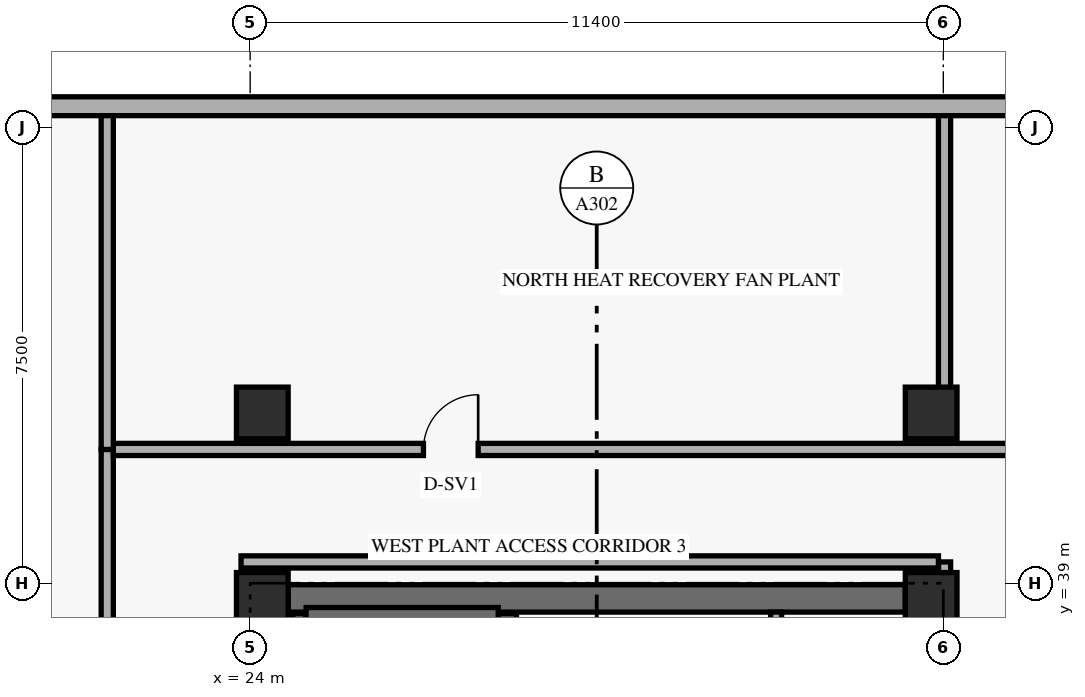
"""IFC4 building model, lengths in metres.
Left out: names, types, materials, properties, quantities, classifications, styles, units other than length and angle.
Written with IfcOpenShell. Run it as: python <this file> out.ifc"""

import sys

from ifc_helpers import new_model, si_unit, direction, frame, frame_2d, origin, origin_2d, place, context, subcontext, project, spatial, rectangle, extrude, element, fill, save


model = new_model("IFC4")
c1 = context("Model", 3, precision=1e-05, world=origin(), true_north=direction((0.0, 1.0)))
c2 = subcontext(c1, "Body", "Model", "MODEL_VIEW")
j1 = project(units=[si_unit("LENGTHUNIT", "METRE"), si_unit("PLANEANGLEUNIT", "RADIAN")], contexts=[c1])
p1 = place(None, origin())
s1 = spatial("IfcSite", under=j1, at=p1, CompositionType="ELEMENT")
p2 = place(p1, origin())
s2 = spatial("IfcBuilding", under=s1, at=p2, CompositionType="ELEMENT")
p3 = place(p2, frame((0.0, 0.0, 71.4)))
s3 = spatial("IfcBuildingStorey", under=s2, at=p3, CompositionType="ELEMENT", Elevation=71.4)
p4 = place(p3, frame((24.625, 38.75, 0.0), z_axis=(0.0, 0.0, 1.0), x_axis=(1.0, 0.0, 0.0)))
e1 = element("IfcWall", 1, at=p4, inside=s3, PredefinedType="SHEAR", context=c2, shape_type="SweptSolid", body=[
    extrude(rectangle(XDim=10.15, YDim=0.45, at=frame_2d((5.075, 0.0))), origin(), (0.0, 0.0, 1.0), 4.99),
])
p5 = place(p3, frame((24.81, 30.74, 0.0), z_axis=(0.0, 0.0, 1.0), x_axis=(0.0, 1.0, 0.0)))
e2 = element("IfcWall", 2, at=p5, inside=s3, PredefinedType="SHEAR", context=c2, shape_type="SweptSolid", body=[
    extrude(rectangle(XDim=7.76, YDim=0.22, at=frame_2d((3.88, 0.0))), origin(), (0.0, 0.0, 1.0), 4.99),
])
p6 = place(p3, frame((28.23, 30.74, 0.0), z_axis=(0.0, 0.0, 1.0), x_axis=(0.0, 1.0, 0.0)))
e3 = element("IfcWall", 3, at=p6, inside=s3, PredefinedType="SHEAR", context=c2, shape_type="SweptSolid", body=[
    extrude(rectangle(XDim=7.76, YDim=0.3, at=frame_2d((3.88, 0.0))), origin(), (0.0, 0.0, 1.0), 4.99),
])
p7 = place(p3, frame((24.92, 38.49, 0.0), z_axis=(0.0, 0.0, 1.0), x_axis=(1.0, 0.0, 0.0)))
e4 = element("IfcWall", 4, at=p7, inside=s3, PredefinedType="SHEAR", context=c2, shape_type="SweptSolid", body=[
    extrude(rectangle(XDim=3.16, YDim=0.22, at=frame_2d((1.58, 0.0))), origin(), (0.0, 0.0, 1.0), 4.99),
])
for number, where, z_axis, x_axis in (
    (5, (24.2, 38.75, 0.0), (0.0, 0.0, 1.0), (1.0, 0.0, 0.0)),
    (6, (24.2, 41.8, 0.0), (0.0, 0.0, 1.0), (1.0, 0.0, 0.0)),
    (7, (35.2, 38.75, 0.0), (0.0, 0.0, 1.0), (1.0, 0.0, 0.0)),
    (8, (35.2, 41.8, 0.0), (0.0, 0.0, 1.0), (1.0, 0.0, 0.0)),
):
    element("IfcColumn", number, at=place(p3, frame(where, z_axis=z_axis, x_axis=x_axis)), inside=s3, PredefinedType="COLUMN", context=c2, shape_type="SweptSolid", body=[
        extrude(rectangle(XDim=0.85, YDim=0.85, at=origin_2d()), origin(), (0.0, 0.0, 1.0), 5.4),
    ])
p8 = place(p3, frame((44.98, 46.845, 0.0), z_axis=(0.0, 0.0, 1.0), x_axis=(-1.0, 0.0, 0.0)))
e9 = element("IfcWall", 9, at=p8, inside=s3, PredefinedType="SOLIDWALL", context=c2, shape_type="SweptSolid", body=[
    extrude(rectangle(XDim=39.56, YDim=0.31, at=frame_2d((19.78, 0.0))), origin(), (0.0, 0.0, 1.0), 4.99),
])
p9 = place(p3, frame((32.65, 31.35, 0.0), z_axis=(0.0, 0.0, 1.0), x_axis=(0.0, 1.0, 0.0)))
e10 = element("IfcWall", 10, at=p9, inside=s3, PredefinedType="STANDARD", context=c2, shape_type="SweptSolid", body=[
    extrude(rectangle(XDim=7.175, YDim=0.18, at=frame_2d((3.587, 0.0))), origin(), (0.0, 0.0, 1.0), 4.99),
])
p10 = place(p3, frame((35.42, 38.75, 0.0), z_axis=(0.0, 0.0, 1.0), x_axis=(0.0, 1.0, 0.0)))
e11 = element("IfcWall", 11, at=p10, inside=s3, PredefinedType="STANDARD", context=c2, shape_type="SweptSolid", body=[
    extrude(rectangle(XDim=0.6, YDim=0.2, at=frame_2d((0.3, 0.0))), origin(), (0.0, 0.0, 1.0), 4.279),
])
p11 = place(p3, frame((35.42, 41.2, 0.0), z_axis=(0.0, 0.0, 1.0), x_axis=(0.0, 1.0, 0.0)))
e12 = element("IfcWall", 12, at=p11, inside=s3, PredefinedType="STANDARD", context=c2, shape_type="SweptSolid", body=[
    extrude(rectangle(XDim=5.49, YDim=0.2, at=frame_2d((2.745, 0.0))), origin(), (0.0, 0.0, 1.0), 4.279),
])
p12 = place(p3, frame((21.65, 6.8, 0.0), z_axis=(0.0, 0.0, 1.0), x_axis=(0.0, 1.0, 0.0)))
e13 = element("IfcWall", 13, at=p12, inside=s3, PredefinedType="STANDARD", context=c2, shape_type="SweptSolid", body=[
    extrude(rectangle(XDim=34.4, YDim=0.2, at=frame_2d((17.2, 0.0))), origin(), (0.0, 0.0, 1.0), 4.279),
])
p13 = place(p12, frame((7.0, 0.0, 0.0)))
e14 = element("IfcOpeningElement", 14, at=p13, cuts=e13, PredefinedType="OPENING", context=c2, shape_type="SweptSolid", body=[
    extrude(rectangle(XDim=1.05, YDim=2.15, at=frame_2d((0.525, 1.075))), frame((0.0, 0.11, 0.0), z_axis=(0.0, -1.0, 0.0), x_axis=(1.0, 0.0, 0.0)), (0.0, 0.0, 1.0), 0.22),
])
p14 = place(p12, frame((21.0, 0.0, 0.0)))
e15 = element("IfcOpeningElement", 15, at=p14, cuts=e13, PredefinedType="OPENING", context=c2, shape_type="SweptSolid", body=[
    extrude(rectangle(XDim=1.05, YDim=2.15, at=frame_2d((0.525, 1.075))), frame((0.0, 0.11, 0.0), z_axis=(0.0, -1.0, 0.0), x_axis=(1.0, 0.0, 0.0)), (0.0, 0.0, 1.0), 0.22),
])
p15 = place(p3, frame((21.75, 41.2, 0.0), z_axis=(0.0, 0.0, 1.0), x_axis=(1.0, 0.0, 0.0)))
e16 = element("IfcWall", 16, at=p15, inside=s3, PredefinedType="STANDARD", context=c2, shape_type="SweptSolid", body=[
    extrude(rectangle(XDim=15.6, YDim=0.2, at=frame_2d((7.8, 0.0))), origin(), (0.0, 0.0, 1.0), 4.279),
])
p16 = place(p15, frame((5.1, 0.0, 0.0)))
e17 = element("IfcOpeningElement", 17, at=p16, cuts=e16, PredefinedType="OPENING", context=c2, shape_type="SweptSolid", body=[
    extrude(rectangle(XDim=0.9, YDim=2.1, at=frame_2d((0.45, 1.05))), frame((0.0, 0.11, 0.0), z_axis=(0.0, -1.0, 0.0), x_axis=(1.0, 0.0, 0.0)), (0.0, 0.0, 1.0), 0.22),
])
p17 = place(p3, frame((23.85, 39.35, 0.0), z_axis=(0.0, 0.0, 1.0), x_axis=(1.0, 0.0, 0.0)))
e18 = element("IfcWall", 18, at=p17, inside=s3, PredefinedType="STANDARD", context=c2, shape_type="SweptSolid", body=[
    extrude(rectangle(XDim=11.47, YDim=0.2, at=frame_2d((5.735, 0.0))), origin(), (0.0, 0.0, 1.0), 4.279),
])
p18 = place(p3, frame((21.65, 41.2, 0.0), z_axis=(0.0, 0.0, 1.0), x_axis=(0.0, 1.0, 0.0)))
e19 = element("IfcWall", 19, at=p18, inside=s3, PredefinedType="STANDARD", context=c2, shape_type="SweptSolid", body=[
    extrude(rectangle(XDim=5.49, YDim=0.2, at=frame_2d((2.745, 0.0))), origin(), (0.0, 0.0, 1.0), 4.439),
])
p19 = place(p16, origin())
e20 = element("IfcDoor", 20, at=p19, inside=s3, OperationType="SINGLE_SWING_RIGHT", PredefinedType="DOOR", context=c2, shape_type="SweptSolid", body=[
    extrude(rectangle(XDim=0.9, YDim=2.1, at=frame_2d((0.45, 1.05))), frame((0.0, 0.025, 0.0), z_axis=(0.0, -1.0, 0.0), x_axis=(1.0, 0.0, 0.0)), (0.0, 0.0, 1.0), 0.05),
])
fill(e17, e20)
save(model, sys.argv[1])
